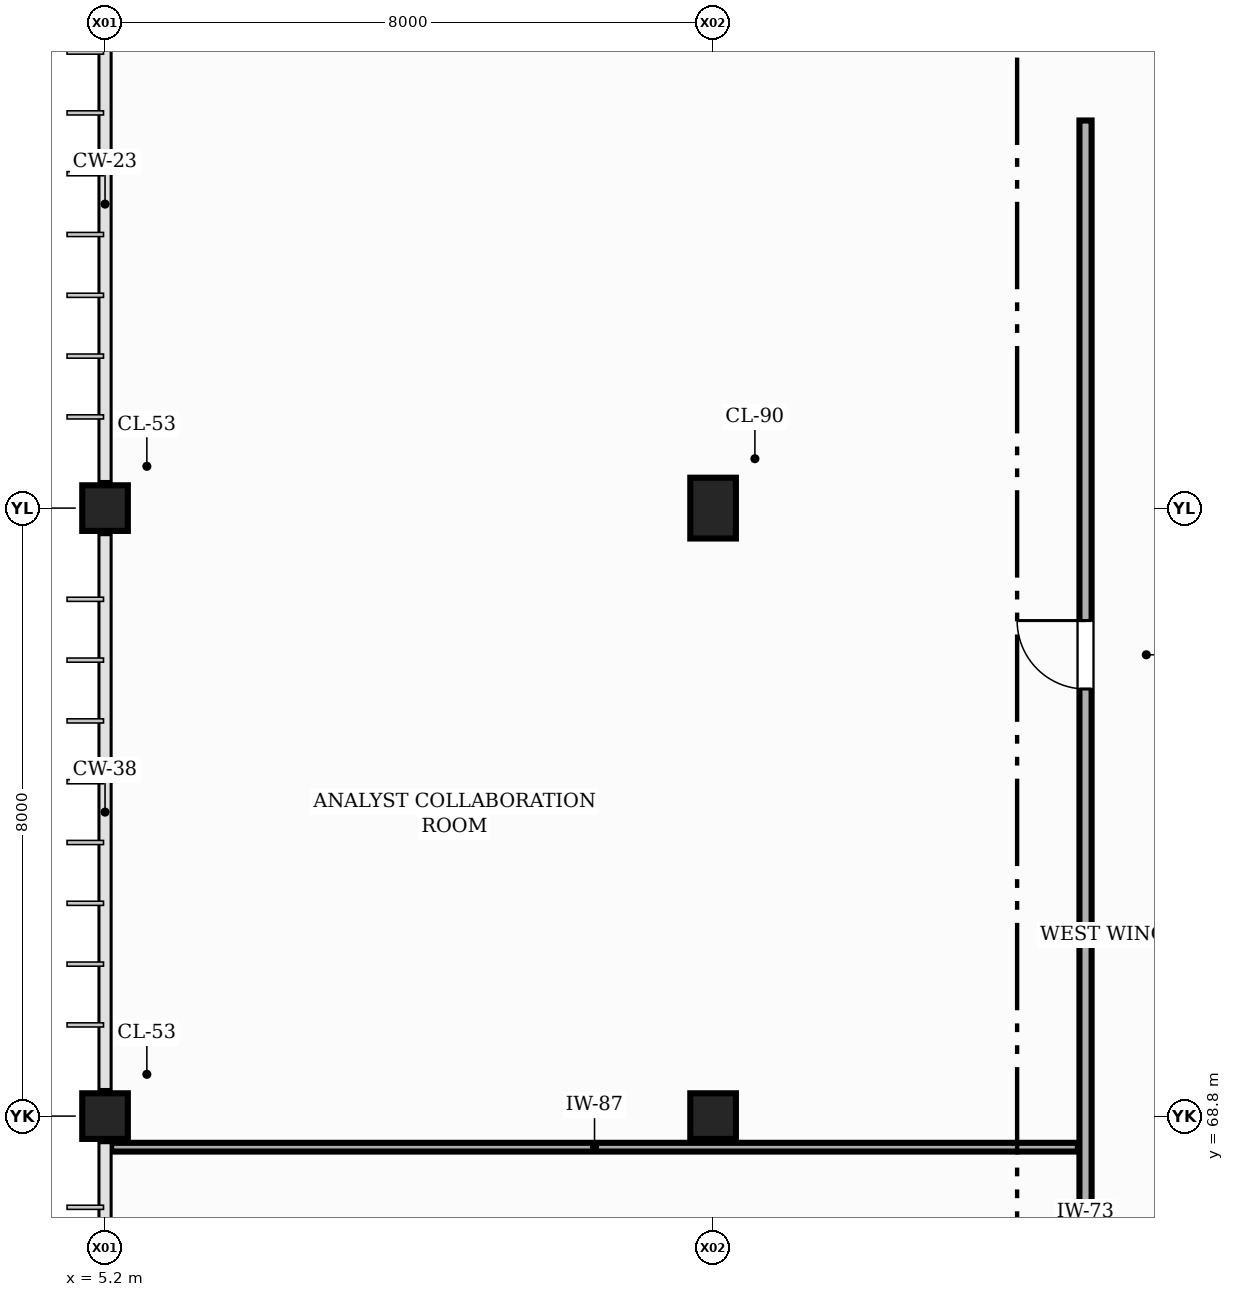
"""IFC4 building model, lengths in metres.
Left out: names, types, materials, properties, quantities, classifications, styles, units other than length and angle.
Written with IfcOpenShell. Run it as: python <this file> out.ifc"""

import sys

from ifc_helpers import new_model, si_unit, direction, frame, frame_2d, origin, origin_2d, place, context, subcontext, project, spatial, rectangle, extrude, element, fill, save


model = new_model("IFC4")
c1 = context("Model", 3, precision=1e-05, world=origin(), true_north=direction((0.0, 1.0)))
c2 = subcontext(c1, "Body", "Model", "MODEL_VIEW")
j1 = project(units=[si_unit("LENGTHUNIT", "METRE"), si_unit("PLANEANGLEUNIT", "RADIAN")], contexts=[c1])
p1 = place(None, origin())
s1 = spatial("IfcSite", under=j1, at=p1, CompositionType="ELEMENT")
p2 = place(p1, origin())
s2 = spatial("IfcBuilding", under=s1, at=p2, CompositionType="ELEMENT")
p3 = place(p2, frame((0.0, 0.0, 13.5)))
s3 = spatial("IfcBuildingStorey", under=s2, at=p3, CompositionType="ELEMENT", Elevation=13.5)
for number, where, z_axis, x_axis in (
    (1, (5.2, 68.8, 0.0), (0.0, 0.0, 1.0), (1.0, 0.0, 0.0)),
    (2, (5.2, 76.8, 0.0), (0.0, 0.0, 1.0), (1.0, 0.0, 0.0)),
    (3, (13.2, 68.8, 0.0), (0.0, 0.0, 1.0), (1.0, 0.0, 0.0)),
):
    element("IfcColumn", number, at=place(p3, frame(where, z_axis=z_axis, x_axis=x_axis)), inside=s3, PredefinedType="COLUMN", context=c2, shape_type="SweptSolid", body=[
        extrude(rectangle(XDim=0.6, YDim=0.6, at=origin_2d()), origin(), (0.0, 0.0, 1.0), 4.5),
    ])
p4 = place(p3, frame((13.2, 76.8, 0.0), z_axis=(0.0, 0.0, 1.0), x_axis=(1.0, 0.0, 0.0)))
e4 = element("IfcColumn", 4, at=p4, inside=s3, PredefinedType="COLUMN", context=c2, shape_type="SweptSolid", body=[
    extrude(rectangle(XDim=0.6, YDim=0.8, at=origin_2d()), origin(), (0.0, 0.0, 1.0), 4.5),
])
p5 = place(p3, frame((5.28, 68.391, 0.0), z_axis=(0.0, 0.0, 1.0), x_axis=(1.0, 0.0, 0.0)))
e5 = element("IfcWall", 5, at=p5, inside=s3, PredefinedType="PARTITIONING", context=c2, shape_type="SweptSolid", body=[
    extrude(rectangle(XDim=12.72, YDim=0.115, at=frame_2d((6.36, 0.0))), origin(), (0.0, 0.0, 1.0), 3.475),
])
p6 = place(p3, frame((18.1, 52.08, 0.0), z_axis=(0.0, 0.0, 1.0), x_axis=(0.0, 1.0, 0.0)))
e6 = element("IfcWall", 6, at=p6, inside=s3, PredefinedType="PARTITIONING", context=c2, shape_type="SweptSolid", body=[
    extrude(rectangle(XDim=29.82, YDim=0.16, at=frame_2d((14.91, 0.0))), origin(), (0.0, 0.0, 1.0), 3.325),
])
p7 = place(p6, frame((7.51, 0.0, 0.0)))
e7 = element("IfcOpeningElement", 7, at=p7, cuts=e6, PredefinedType="OPENING", context=c2, shape_type="SweptSolid", body=[
    extrude(rectangle(XDim=1.1, YDim=2.1, at=frame_2d((0.55, 1.05))), frame((0.0, 0.09, 0.0), z_axis=(0.0, -1.0, 0.0), x_axis=(1.0, 0.0, 0.0)), (0.0, 0.0, 1.0), 0.18),
])
p8 = place(p6, frame((22.34, 0.0, 0.0)))
e8 = element("IfcOpeningElement", 8, at=p8, cuts=e6, PredefinedType="OPENING", context=c2, shape_type="SweptSolid", body=[
    extrude(rectangle(XDim=0.9, YDim=2.1, at=frame_2d((0.45, 1.05))), frame((0.0, 0.09, 0.0), z_axis=(0.0, -1.0, 0.0), x_axis=(1.0, 0.0, 0.0)), (0.0, 0.0, 1.0), 0.18),
])
p9 = place(p8, origin())
e9 = element("IfcDoor", 9, at=p9, inside=s3, OperationType="SINGLE_SWING_RIGHT", PredefinedType="DOOR", context=c2, shape_type="SweptSolid", body=[
    extrude(rectangle(XDim=0.9, YDim=2.1, at=frame_2d((0.45, 1.05))), frame((0.0, 0.025, 0.0), z_axis=(0.0, -1.0, 0.0), x_axis=(1.0, 0.0, 0.0)), (0.0, 0.0, 1.0), 0.05),
])
fill(e8, e9)
save(model, sys.argv[1])
